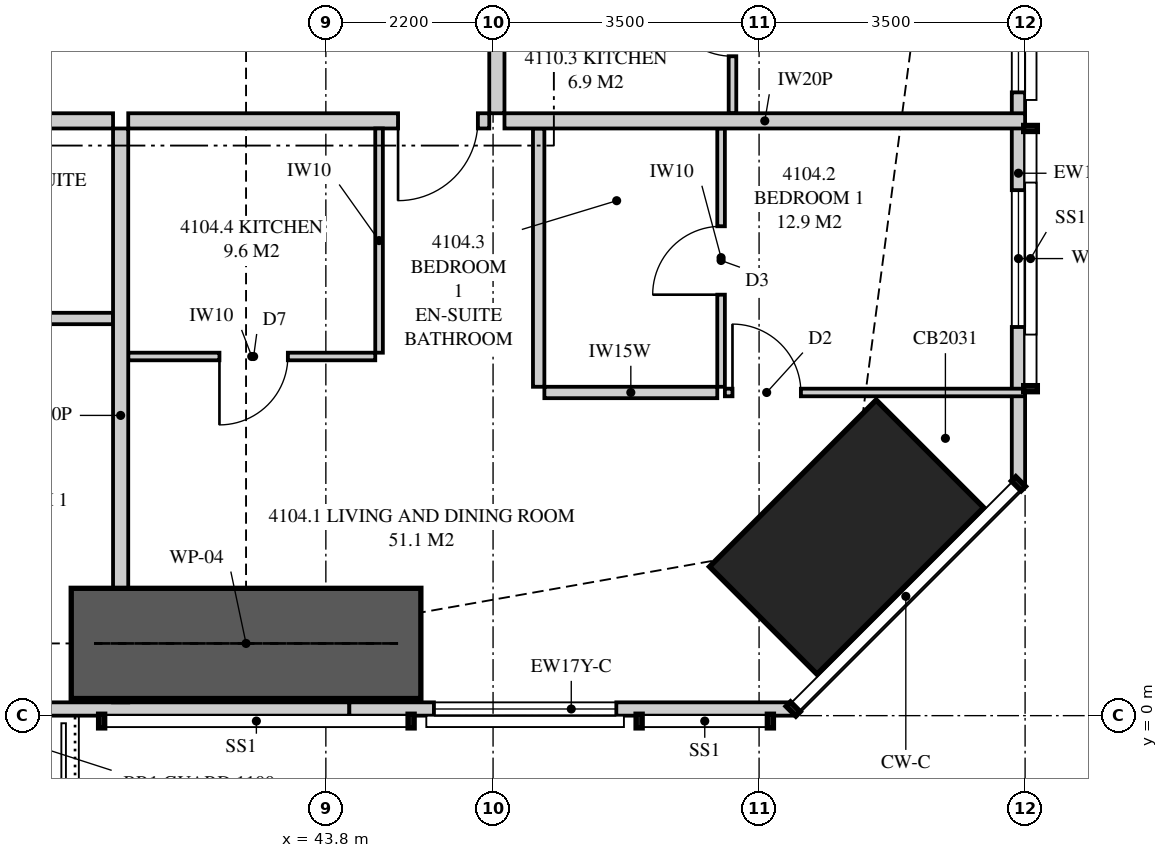
"""IFC4 building model, lengths in metres.
Left out: names, types, materials, properties, quantities, classifications, styles, units other than length and angle.
Written with IfcOpenShell. Run it as: python <this file> out.ifc"""

import sys

from ifc_helpers import new_model, si_unit, direction, frame, frame_2d, origin, origin_2d, place, context, subcontext, project, spatial, polyline, rectangle, hollow_rectangle, outline, extrude, element, fill, save


model = new_model("IFC4")
c1 = context("Model", 3, precision=1e-05, world=origin(), true_north=direction((0.0, 1.0)))
c2 = subcontext(c1, "Body", "Model", "MODEL_VIEW")
j1 = project(units=[si_unit("LENGTHUNIT", "METRE"), si_unit("PLANEANGLEUNIT", "RADIAN")], contexts=[c1])
p1 = place(None, origin())
s1 = spatial("IfcSite", under=j1, at=p1, CompositionType="ELEMENT")
p2 = place(p1, origin())
s2 = spatial("IfcBuilding", under=s1, at=p2, CompositionType="ELEMENT")
p3 = place(p2, frame((0.0, 0.0, 154.35)))
s3 = spatial("IfcBuildingStorey", under=s2, at=p3, CompositionType="ELEMENT", Elevation=154.35)
p4 = place(p3, frame((50.652, 2.348, 0.0), z_axis=(0.0, 0.0, 1.0), x_axis=(-0.707106781187, 0.707106781187, 0.0)))
e1 = element("IfcColumn", 1, at=p4, inside=s3, PredefinedType="COLUMN", context=c2, shape_type="SweptSolid", body=[
    extrude(hollow_rectangle(XDim=2.0, YDim=3.1, WallThickness=0.125, at=origin_2d()), origin(), (0.0, 0.0, 1.0), 3.35),
])
p5 = place(p3, frame((20.891, 0.087, 0.0), z_axis=(0.0, 0.0, 1.0), x_axis=(1.0, 0.0, 0.0)))
e2 = element("IfcWall", 2, at=p5, inside=s3, PredefinedType="SOLIDWALL", context=c2, shape_type="SweptSolid", body=[
    extrude(rectangle(XDim=23.218, YDim=0.175, at=frame_2d((11.609, 0.0))), origin(), (0.0, 0.0, 1.0), 2.15),
])
p6 = place(p5, frame((4.559, 0.0, 0.0)))
e3 = element("IfcOpeningElement", 3, at=p6, cuts=e2, PredefinedType="OPENING", context=c2, shape_type="SweptSolid", body=[
    extrude(rectangle(XDim=1.8, YDim=2.1, at=frame_2d((0.9, 1.05))), frame((0.0, 0.097, 0.0), z_axis=(0.0, -1.0, 0.0), x_axis=(1.0, 0.0, 0.0)), (0.0, 0.0, 1.0), 0.195),
])
p7 = place(p5, frame((7.384, 0.0, 0.4)))
e4 = element("IfcOpeningElement", 4, at=p7, cuts=e2, PredefinedType="OPENING", context=c2, shape_type="SweptSolid", body=[
    extrude(rectangle(XDim=1.8, YDim=1.7, at=frame_2d((0.9, 0.85))), frame((0.0, 0.097, 0.0), z_axis=(0.0, -1.0, 0.0), x_axis=(1.0, 0.0, 0.0)), (0.0, 0.0, 1.0), 0.195),
])
p8 = place(p5, frame((14.009, 0.0, 0.4)))
e5 = element("IfcOpeningElement", 5, at=p8, cuts=e2, PredefinedType="OPENING", context=c2, shape_type="SweptSolid", body=[
    extrude(rectangle(XDim=2.4, YDim=1.7, at=frame_2d((1.2, 0.85))), frame((0.0, 0.097, 0.0), z_axis=(0.0, -1.0, 0.0), x_axis=(1.0, 0.0, 0.0)), (0.0, 0.0, 1.0), 0.195),
])
p9 = place(p5, frame((16.959, 0.0, 0.0)))
e6 = element("IfcOpeningElement", 6, at=p9, cuts=e2, PredefinedType="OPENING", context=c2, shape_type="SweptSolid", body=[
    extrude(rectangle(XDim=1.8, YDim=2.1, at=frame_2d((0.9, 1.05))), frame((0.0, 0.097, 0.0), z_axis=(0.0, -1.0, 0.0), x_axis=(1.0, 0.0, 0.0)), (0.0, 0.0, 1.0), 0.195),
])
p10 = place(p3, frame((44.109, 0.087, 0.0), z_axis=(0.0, 0.0, 1.0), x_axis=(1.0, 0.0, 0.0)))
e7 = element("IfcWall", 7, at=p10, inside=s3, PredefinedType="SOLIDWALL", context=c2, shape_type="SweptSolid", body=[
    extrude(rectangle(XDim=5.84, YDim=0.175, at=frame_2d((2.92, 0.0))), origin(), (0.0, 0.0, 1.0), 3.11),
])
p11 = place(p10, frame((1.113, 0.0, 0.4)))
e8 = element("IfcOpeningElement", 8, at=p11, cuts=e7, PredefinedType="OPENING", context=c2, shape_type="SweptSolid", body=[
    extrude(rectangle(XDim=2.4, YDim=1.7, at=frame_2d((1.2, 0.85))), frame((0.0, 0.097, 0.0), z_axis=(0.0, -1.0, 0.0), x_axis=(1.0, 0.0, 0.0)), (0.0, 0.0, 1.0), 0.195),
])
p12 = place(p3, frame((52.913, 3.051, 0.0), z_axis=(0.0, 0.0, 1.0), x_axis=(0.0, 1.0, 0.0)))
e9 = element("IfcWall", 9, at=p12, inside=s3, PredefinedType="SOLIDWALL", context=c2, shape_type="SweptSolid", body=[
    extrude(rectangle(XDim=8.17, YDim=0.175, at=frame_2d((4.085, 0.0))), origin(), (0.0, 0.0, 1.0), 3.11),
])
p13 = place(p12, frame((2.062, 0.0, 0.4)))
e10 = element("IfcOpeningElement", 10, at=p13, cuts=e9, PredefinedType="OPENING", context=c2, shape_type="SweptSolid", body=[
    extrude(rectangle(XDim=1.8, YDim=1.7, at=frame_2d((0.9, 0.85))), frame((0.0, 0.097, 0.0), z_axis=(0.0, -1.0, 0.0), x_axis=(1.0, 0.0, 0.0)), (0.0, 0.0, 1.0), 0.195),
])
p14 = place(p12, frame((5.149, 0.0, 0.4)))
e11 = element("IfcOpeningElement", 11, at=p14, cuts=e9, PredefinedType="OPENING", context=c2, shape_type="SweptSolid", body=[
    extrude(rectangle(XDim=2.4, YDim=1.7, at=frame_2d((1.2, 0.85))), frame((0.0, 0.097, 0.0), z_axis=(0.0, -1.0, 0.0), x_axis=(1.0, 0.0, 0.0)), (0.0, 0.0, 1.0), 0.195),
])
p15 = place(p3, frame((41.1, 0.175, 0.0), z_axis=(0.0, 0.0, 1.0), x_axis=(0.0, 1.0, 0.0)))
e12 = element("IfcWall", 12, at=p15, inside=s3, PredefinedType="PARTITIONING", context=c2, shape_type="SweptSolid", body=[
    extrude(outline(polyline([(0.529, 2.15), (0.0, 2.15), (0.0, 0.0), (0.529, 0.0), (0.529, 0.038), (1.021, 0.038), (1.021, 0.0), (7.55, 0.0), (7.55, 3.11), (1.885, 3.11), (1.885, 2.15), (1.021, 2.15), (1.021, 1.961), (0.529, 1.961), (0.529, 2.15)])), frame((0.0, 0.1, 0.0), z_axis=(0.0, -1.0, 0.0), x_axis=(1.0, 0.0, 0.0)), (0.0, 0.0, 1.0), 0.2),
])
p16 = place(p3, frame((37.55, 5.225, 0.0), z_axis=(0.0, 0.0, 1.0), x_axis=(1.0, 0.0, 0.0)))
e13 = element("IfcWall", 13, at=p16, inside=s3, PredefinedType="PLUMBINGWALL", context=c2, shape_type="SweptSolid", body=[
    extrude(rectangle(XDim=3.45, YDim=0.15, at=frame_2d((1.725, 0.0))), origin(), (0.0, 0.0, 1.0), 3.11),
])
p17 = place(p16, frame((0.4, 0.0, 0.0)))
e14 = element("IfcOpeningElement", 14, at=p17, cuts=e13, PredefinedType="OPENING", context=c2, shape_type="SweptSolid", body=[
    extrude(rectangle(XDim=0.9, YDim=2.1, at=frame_2d((0.45, 1.05))), frame((0.0, 0.085, 0.0), z_axis=(0.0, -1.0, 0.0), x_axis=(1.0, 0.0, 0.0)), (0.0, 0.0, 1.0), 0.17),
])
p18 = place(p3, frame((41.2, 7.825, 0.0), z_axis=(0.0, 0.0, 1.0), x_axis=(1.0, 0.0, 0.0)))
e15 = element("IfcWall", 15, at=p18, inside=s3, PredefinedType="PARTITIONING", context=c2, shape_type="SweptSolid", body=[
    extrude(outline(polyline([(0.0, 0.0), (4.75, 0.0), (4.75, 3.11), (1.896, 3.11), (1.896, 2.531), (1.204, 2.531), (1.204, 3.11), (0.0, 3.11), (0.0, 0.0)])), frame((0.0, 0.1, 0.0), z_axis=(0.0, -1.0, 0.0), x_axis=(1.0, 0.0, 0.0)), (0.0, 0.0, 1.0), 0.2),
])
p19 = place(p18, frame((3.55, 0.0, 0.0)))
e16 = element("IfcOpeningElement", 16, at=p19, cuts=e15, PredefinedType="OPENING", context=c2, shape_type="SweptSolid", body=[
    extrude(rectangle(XDim=1.05, YDim=2.2, at=frame_2d((0.525, 1.1))), frame((0.0, 0.11, 0.0), z_axis=(0.0, -1.0, 0.0), x_axis=(1.0, 0.0, 0.0)), (0.0, 0.0, 1.0), 0.22),
])
p20 = place(p3, frame((49.0, 4.327, 0.0), z_axis=(0.0, 0.0, 1.0), x_axis=(0.0, 1.0, 0.0)))
e17 = element("IfcWall", 17, at=p20, inside=s3, PredefinedType="PARTITIONING", context=c2, shape_type="SweptSolid", body=[
    extrude(rectangle(XDim=3.398, YDim=0.1, at=frame_2d((1.699, 0.0))), origin(), (0.0, 0.0, 1.0), 3.11),
])
p21 = place(p20, frame((1.212, 0.0, 0.0)))
e18 = element("IfcOpeningElement", 18, at=p21, cuts=e17, PredefinedType="OPENING", context=c2, shape_type="SweptSolid", body=[
    extrude(rectangle(XDim=0.9, YDim=2.1, at=frame_2d((0.45, 1.05))), frame((0.0, 0.06, 0.0), z_axis=(0.0, -1.0, 0.0), x_axis=(1.0, 0.0, 0.0)), (0.0, 0.0, 1.0), 0.12),
])
p22 = place(p3, frame((49.05, 4.252, 0.0), z_axis=(0.0, 0.0, 1.0), x_axis=(1.0, 0.0, 0.0)))
e19 = element("IfcWall", 19, at=p22, inside=s3, PredefinedType="PARTITIONING", context=c2, shape_type="SweptSolid", body=[
    extrude(outline(polyline([(0.782, 3.11), (0.0, 3.11), (0.0, 0.0), (2.451, 0.0), (2.639, 0.458), (2.73, 0.427), (2.811, 0.394), (2.811, 0.0), (3.95, 0.0), (3.95, 3.11), (2.92, 3.11), (2.92, 2.15), (0.782, 2.15), (0.782, 3.11)])), frame((0.0, 0.05, 0.0), z_axis=(0.0, -1.0, 0.0), x_axis=(1.0, 0.0, 0.0)), (0.0, 0.0, 1.0), 0.1),
])
p23 = place(p22, frame((0.1, 0.0, 0.0)))
e20 = element("IfcOpeningElement", 20, at=p23, cuts=e19, PredefinedType="OPENING", context=c2, shape_type="SweptSolid", body=[
    extrude(rectangle(XDim=0.9, YDim=2.1, at=frame_2d((0.45, 1.05))), frame((0.0, 0.06, 0.0), z_axis=(0.0, -1.0, 0.0), x_axis=(1.0, 0.0, 0.0)), (0.0, 0.0, 1.0), 0.12),
])
p24 = place(p3, frame((46.675, 4.252, 0.0), z_axis=(0.0, 0.0, 1.0), x_axis=(1.0, 0.0, 0.0)))
e21 = element("IfcWall", 21, at=p24, inside=s3, PredefinedType="PLUMBINGWALL", context=c2, shape_type="SweptSolid", body=[
    extrude(rectangle(XDim=2.275, YDim=0.15, at=frame_2d((1.137, 0.0))), origin(), (0.0, 0.0, 1.0), 3.11),
])
p25 = place(p3, frame((46.6, 4.327, 0.0), z_axis=(0.0, 0.0, 1.0), x_axis=(0.0, 1.0, 0.0)))
e22 = element("IfcWall", 22, at=p25, inside=s3, PredefinedType="PLUMBINGWALL", context=c2, shape_type="SweptSolid", body=[
    extrude(rectangle(XDim=3.398, YDim=0.15, at=frame_2d((1.699, 0.0))), origin(), (0.0, 0.0, 1.0), 3.11),
])
p26 = place(p3, frame((41.2, 4.725, 0.0), z_axis=(0.0, 0.0, 1.0), x_axis=(1.0, 0.0, 0.0)))
e23 = element("IfcWall", 23, at=p26, inside=s3, PredefinedType="PARTITIONING", context=c2, shape_type="SweptSolid", body=[
    extrude(outline(polyline([(0.0, 0.0), (3.25, 0.0), (3.25, 3.11), (1.846, 3.11), (1.846, 2.531), (1.254, 2.531), (1.254, 3.11), (0.0, 3.11), (0.0, 0.0)])), frame((0.0, 0.05, 0.0), z_axis=(0.0, -1.0, 0.0), x_axis=(1.0, 0.0, 0.0)), (0.0, 0.0, 1.0), 0.1),
])
p27 = place(p26, frame((1.2, 0.0, 0.0)))
e24 = element("IfcOpeningElement", 24, at=p27, cuts=e23, PredefinedType="OPENING", context=c2, shape_type="SweptSolid", body=[
    extrude(rectangle(XDim=0.9, YDim=2.1, at=frame_2d((0.45, 1.05))), frame((0.0, 0.06, 0.0), z_axis=(0.0, -1.0, 0.0), x_axis=(1.0, 0.0, 0.0)), (0.0, 0.0, 1.0), 0.12),
])
p28 = place(p3, frame((44.5, 4.775, 0.0), z_axis=(0.0, 0.0, 1.0), x_axis=(0.0, 1.0, 0.0)))
e25 = element("IfcWall", 25, at=p28, inside=s3, PredefinedType="PARTITIONING", context=c2, shape_type="SweptSolid", body=[
    extrude(rectangle(XDim=2.95, YDim=0.1, at=frame_2d((1.475, 0.0))), origin(), (0.0, 0.0, 1.0), 3.11),
])
p29 = place(p3, frame((46.15, 7.825, 0.0), z_axis=(0.0, 0.0, 1.0), x_axis=(1.0, 0.0, 0.0)))
e26 = element("IfcWall", 26, at=p29, inside=s3, PredefinedType="PARTITIONING", context=c2, shape_type="SweptSolid", body=[
    extrude(outline(polyline([(0.0, 0.0), (6.85, 0.0), (6.85, 3.11), (6.34, 3.11), (6.34, 2.15), (4.101, 2.15), (4.101, 3.11), (0.0, 3.11), (0.0, 0.0)])), frame((0.0, 0.1, 0.0), z_axis=(0.0, -1.0, 0.0), x_axis=(1.0, 0.0, 0.0)), (0.0, 0.0, 1.0), 0.2),
])
p30 = place(p3, frame((46.05, 7.925, 0.0), z_axis=(0.0, 0.0, 1.0), x_axis=(0.0, 1.0, 0.0)))
e27 = element("IfcWall", 27, at=p30, inside=s3, PredefinedType="PARTITIONING", context=c2, shape_type="SweptSolid", body=[
    extrude(outline(polyline([(0.0, 0.0), (6.475, 0.0), (6.475, 3.11), (5.421, 3.11), (5.421, 2.531), (4.729, 2.531), (4.729, 3.11), (0.0, 3.11), (0.0, 0.0)])), frame((0.0, 0.1, 0.0), z_axis=(0.0, -1.0, 0.0), x_axis=(1.0, 0.0, 0.0)), (0.0, 0.0, 1.0), 0.2),
])
p31 = place(p30, frame((2.738, 0.0, 0.0)))
e28 = element("IfcOpeningElement", 28, at=p31, cuts=e27, PredefinedType="OPENING", context=c2, shape_type="SweptSolid", body=[
    extrude(rectangle(XDim=1.05, YDim=2.2, at=frame_2d((0.525, 1.1))), frame((0.0, 0.11, 0.0), z_axis=(0.0, -1.0, 0.0), x_axis=(1.0, 0.0, 0.0)), (0.0, 0.0, 1.0), 0.22),
])
p32 = place(p3, frame((49.15, 7.925, 0.0), z_axis=(0.0, 0.0, 1.0), x_axis=(0.0, 1.0, 0.0)))
e29 = element("IfcWall", 29, at=p32, inside=s3, PredefinedType="PARTITIONING", context=c2, shape_type="SweptSolid", body=[
    extrude(rectangle(XDim=2.35, YDim=0.1, at=frame_2d((1.175, 0.0))), origin(), (0.0, 0.0, 1.0), 3.11),
])
p33 = place(p32, frame((0.75, 0.0, 0.0)))
e30 = element("IfcOpeningElement", 30, at=p33, cuts=e29, PredefinedType="OPENING", context=c2, shape_type="SweptSolid", body=[
    extrude(rectangle(XDim=0.9, YDim=2.1, at=frame_2d((0.45, 1.05))), frame((0.0, 0.06, 0.0), z_axis=(0.0, -1.0, 0.0), x_axis=(1.0, 0.0, 0.0)), (0.0, 0.0, 1.0), 0.12),
])
p34 = place(p3, frame((37.25, 7.825, 0.0), z_axis=(0.0, 0.0, 1.0), x_axis=(1.0, 0.0, 0.0)))
e31 = element("IfcWall", 31, at=p34, inside=s3, PredefinedType="PARTITIONING", context=c2, shape_type="SweptSolid", body=[
    extrude(rectangle(XDim=3.75, YDim=0.2, at=frame_2d((1.875, 0.0))), origin(), (0.0, 0.0, 1.0), 3.11),
])
p35 = place(p3, frame((40.45, 0.95, 0.0), z_axis=(0.0, 0.0, 1.0), x_axis=(1.0, 0.0, 0.0)))
e32 = element("IfcWall", 32, at=p35, inside=s3, PredefinedType="SHEAR", context=c2, shape_type="SweptSolid", body=[
    extrude(rectangle(XDim=4.6, YDim=1.45, at=frame_2d((2.3, 0.0))), origin(), (0.0, 0.0, 1.0), 3.35),
])
p36 = place(p11, origin())
e33 = element("IfcWindow", 33, at=p36, inside=s3, PartitioningType="SINGLE_PANEL", PredefinedType="WINDOW", context=c2, shape_type="SweptSolid", body=[
    extrude(rectangle(XDim=2.4, YDim=1.7, at=frame_2d((1.2, 0.85))), frame((0.0, 0.03, 0.0), z_axis=(0.0, -1.0, 0.0), x_axis=(1.0, 0.0, 0.0)), (0.0, 0.0, 1.0), 0.06),
])
fill(e8, e33)
p37 = place(p13, origin())
e34 = element("IfcWindow", 34, at=p37, inside=s3, PartitioningType="SINGLE_PANEL", PredefinedType="WINDOW", context=c2, shape_type="SweptSolid", body=[
    extrude(rectangle(XDim=1.8, YDim=1.7, at=frame_2d((0.9, 0.85))), frame((0.0, 0.03, 0.0), z_axis=(0.0, -1.0, 0.0), x_axis=(1.0, 0.0, 0.0)), (0.0, 0.0, 1.0), 0.06),
])
fill(e10, e34)
p38 = place(p14, origin())
e35 = element("IfcWindow", 35, at=p38, inside=s3, PartitioningType="SINGLE_PANEL", PredefinedType="WINDOW", context=c2, shape_type="SweptSolid", body=[
    extrude(rectangle(XDim=2.4, YDim=1.7, at=frame_2d((1.2, 0.85))), frame((0.0, 0.03, 0.0), z_axis=(0.0, -1.0, 0.0), x_axis=(1.0, 0.0, 0.0)), (0.0, 0.0, 1.0), 0.06),
])
fill(e11, e35)
p39 = place(p19, frame((1.05, 0.0, 0.0), z_axis=(0.0, 0.0, 1.0), x_axis=(-1.0, 0.0, 0.0)))
e36 = element("IfcDoor", 36, at=p39, inside=s3, OperationType="SINGLE_SWING_RIGHT", PredefinedType="DOOR", context=c2, shape_type="SweptSolid", body=[
    extrude(rectangle(XDim=1.05, YDim=2.2, at=frame_2d((0.525, 1.1))), frame((0.0, 0.025, 0.0), z_axis=(0.0, -1.0, 0.0), x_axis=(1.0, 0.0, 0.0)), (0.0, 0.0, 1.0), 0.05),
])
fill(e16, e36)
p40 = place(p23, origin())
e37 = element("IfcDoor", 37, at=p40, inside=s3, OperationType="SINGLE_SWING_LEFT", PredefinedType="DOOR", context=c2, shape_type="SweptSolid", body=[
    extrude(rectangle(XDim=0.9, YDim=2.1, at=frame_2d((0.45, 1.05))), frame((0.0, 0.025, 0.0), z_axis=(0.0, -1.0, 0.0), x_axis=(1.0, 0.0, 0.0)), (0.0, 0.0, 1.0), 0.05),
])
fill(e20, e37)
p41 = place(p21, origin())
e38 = element("IfcDoor", 38, at=p41, inside=s3, OperationType="SINGLE_SWING_LEFT", PredefinedType="DOOR", context=c2, shape_type="SweptSolid", body=[
    extrude(rectangle(XDim=0.9, YDim=2.1, at=frame_2d((0.45, 1.05))), frame((0.0, 0.025, 0.0), z_axis=(0.0, -1.0, 0.0), x_axis=(1.0, 0.0, 0.0)), (0.0, 0.0, 1.0), 0.05),
])
fill(e18, e38)
p42 = place(p27, frame((0.9, 0.0, 0.0), z_axis=(0.0, 0.0, 1.0), x_axis=(-1.0, 0.0, 0.0)))
e39 = element("IfcDoor", 39, at=p42, inside=s3, OperationType="SINGLE_SWING_RIGHT", PredefinedType="DOOR", context=c2, shape_type="SweptSolid", body=[
    extrude(rectangle(XDim=0.9, YDim=2.1, at=frame_2d((0.45, 1.05))), frame((0.0, 0.025, 0.0), z_axis=(0.0, -1.0, 0.0), x_axis=(1.0, 0.0, 0.0)), (0.0, 0.0, 1.0), 0.05),
])
fill(e24, e39)
p43 = place(p33, origin())
e40 = element("IfcDoor", 40, at=p43, inside=s3, OperationType="SINGLE_SWING_RIGHT", PredefinedType="DOOR", context=c2, shape_type="SweptSolid", body=[
    extrude(rectangle(XDim=0.9, YDim=2.1, at=frame_2d((0.45, 1.05))), frame((0.0, 0.025, 0.0), z_axis=(0.0, -1.0, 0.0), x_axis=(1.0, 0.0, 0.0)), (0.0, 0.0, 1.0), 0.05),
])
fill(e30, e40)
save(model, sys.argv[1])
